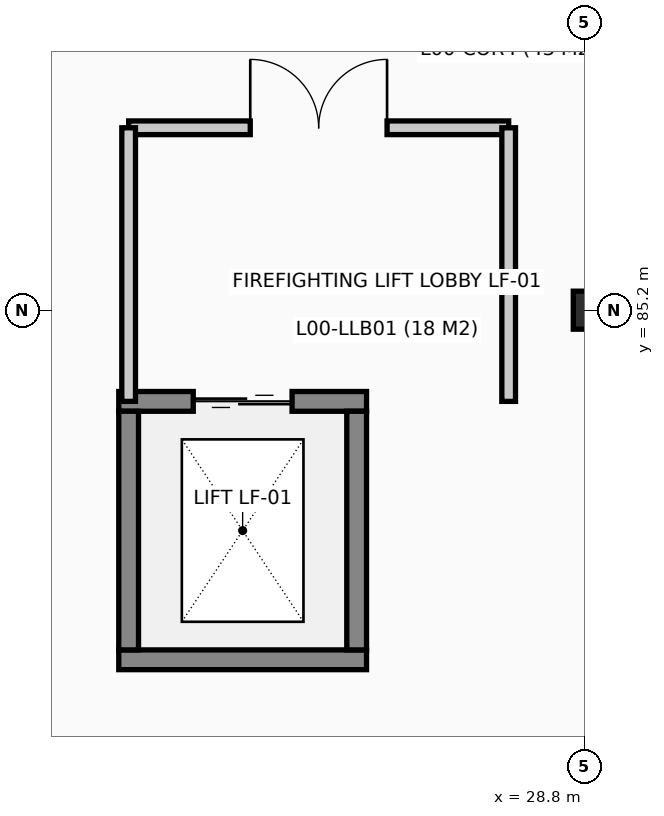
"""IFC4 building model, lengths in metres.
Left out: names, types, materials, properties, quantities, classifications, styles, units other than length and angle.
Written with IfcOpenShell. Run it as: python <this file> out.ifc"""

import sys

from ifc_helpers import new_model, si_unit, direction, frame, frame_2d, origin, origin_2d, place, context, subcontext, project, spatial, rectangle, i_section, extrude, element, fill, save


model = new_model("IFC4")
c1 = context("Model", 3, precision=1e-05, world=origin(), true_north=direction((0.0, 1.0)))
c2 = subcontext(c1, "Body", "Model", "MODEL_VIEW")
j1 = project(units=[si_unit("LENGTHUNIT", "METRE"), si_unit("PLANEANGLEUNIT", "RADIAN")], contexts=[c1])
p1 = place(None, origin())
s1 = spatial("IfcSite", under=j1, at=p1, CompositionType="ELEMENT")
p2 = place(p1, origin())
s2 = spatial("IfcBuilding", under=s1, at=p2, CompositionType="ELEMENT")
p3 = place(p2, origin())
s3 = spatial("IfcBuildingStorey", under=s2, at=p3, CompositionType="ELEMENT", Elevation=0.0)
p4 = place(p3, frame((28.8, 85.2, 0.0), z_axis=(0.0, 0.0, 1.0), x_axis=(1.0, 0.0, 0.0)))
e1 = element("IfcColumn", 1, at=p4, inside=s3, PredefinedType="COLUMN", context=c2, shape_type="SweptSolid", body=[
    extrude(i_section(OverallWidth=0.3, OverallDepth=0.5, WebThickness=0.014, FlangeThickness=0.028, at=origin_2d()), origin(), (0.0, 0.0, 1.0), 4.8),
])
p5 = place(p3, frame((22.67, 80.6, 0.0), z_axis=(0.0, 0.0, 1.0), x_axis=(1.0, 0.0, 0.0)))
e2 = element("IfcWall", 2, at=p5, inside=s3, PredefinedType="SHEAR", context=c2, shape_type="SweptSolid", body=[
    extrude(rectangle(XDim=3.26, YDim=0.26, at=frame_2d((1.63, 0.0))), origin(), (0.0, 0.0, 1.0), 4.58),
])
p6 = place(p3, frame((22.67, 84.0, 0.0), z_axis=(0.0, 0.0, 1.0), x_axis=(1.0, 0.0, 0.0)))
e3 = element("IfcWall", 3, at=p6, inside=s3, PredefinedType="SHEAR", context=c2, shape_type="SweptSolid", body=[
    extrude(rectangle(XDim=3.26, YDim=0.26, at=frame_2d((1.63, 0.0))), origin(), (0.0, 0.0, 1.0), 4.58),
])
p7 = place(p6, frame((0.98, 0.0, 0.0)))
e4 = element("IfcOpeningElement", 4, at=p7, cuts=e3, PredefinedType="OPENING", context=c2, shape_type="SweptSolid", body=[
    extrude(rectangle(XDim=1.3, YDim=2.2, at=frame_2d((0.65, 1.1))), frame((0.0, 0.14, 0.0), z_axis=(0.0, -1.0, 0.0), x_axis=(1.0, 0.0, 0.0)), (0.0, 0.0, 1.0), 0.28),
])
for number, where, z_axis, x_axis in (
    (5, (22.8, 80.73, 0.0), (0.0, 0.0, 1.0), (0.0, 1.0, 0.0)),
    (6, (25.8, 80.73, 0.0), (0.0, 0.0, 1.0), (0.0, 1.0, 0.0)),
):
    element("IfcWall", number, at=place(p3, frame(where, z_axis=z_axis, x_axis=x_axis)), inside=s3, PredefinedType="SHEAR", context=c2, shape_type="SweptSolid", body=[
        extrude(rectangle(XDim=3.14, YDim=0.26, at=frame_2d((1.57, 0.0))), origin(), (0.0, 0.0, 1.0), 4.58),
    ])
p8 = place(p3, frame((22.8, 87.6, 0.0), z_axis=(0.0, 0.0, 1.0), x_axis=(1.0, 0.0, 0.0)))
e7 = element("IfcWall", 7, at=p8, inside=s3, PredefinedType="PARTITIONING", context=c2, shape_type="SweptSolid", body=[
    extrude(rectangle(XDim=5.0, YDim=0.18, at=frame_2d((2.5, 0.0))), origin(), (0.0, 0.0, 1.0), 4.26),
])
p9 = place(p8, frame((1.6, 0.0, 0.0)))
e8 = element("IfcOpeningElement", 8, at=p9, cuts=e7, PredefinedType="OPENING", context=c2, shape_type="SweptSolid", body=[
    extrude(rectangle(XDim=1.8, YDim=2.15, at=frame_2d((0.9, 1.075))), frame((0.0, 0.1, 0.0), z_axis=(0.0, -1.0, 0.0), x_axis=(1.0, 0.0, 0.0)), (0.0, 0.0, 1.0), 0.2),
])
for number, where, z_axis, x_axis in (
    (9, (22.8, 84.0, 0.0), (0.0, 0.0, 1.0), (0.0, 1.0, 0.0)),
    (10, (27.8, 84.0, 0.0), (0.0, 0.0, 1.0), (0.0, 1.0, 0.0)),
):
    element("IfcWall", number, at=place(p3, frame(where, z_axis=z_axis, x_axis=x_axis)), inside=s3, PredefinedType="PARTITIONING", context=c2, shape_type="SweptSolid", body=[
        extrude(rectangle(XDim=3.6, YDim=0.18, at=frame_2d((1.8, 0.0))), origin(), (0.0, 0.0, 1.0), 4.565),
    ])
p10 = place(p7, origin())
e11 = element("IfcDoor", 11, at=p10, inside=s3, OperationType="DOUBLE_DOOR_SLIDING", PredefinedType="DOOR", context=c2, shape_type="SweptSolid", body=[
    extrude(rectangle(XDim=1.3, YDim=2.2, at=frame_2d((0.65, 1.1))), frame((0.0, 0.025, 0.0), z_axis=(0.0, -1.0, 0.0), x_axis=(1.0, 0.0, 0.0)), (0.0, 0.0, 1.0), 0.05),
])
fill(e4, e11)
p11 = place(p9, origin())
e12 = element("IfcDoor", 12, at=p11, inside=s3, OperationType="DOUBLE_DOOR_SINGLE_SWING", PredefinedType="DOOR", context=c2, shape_type="SweptSolid", body=[
    extrude(rectangle(XDim=1.8, YDim=2.15, at=frame_2d((0.9, 1.075))), frame((0.0, 0.025, 0.0), z_axis=(0.0, -1.0, 0.0), x_axis=(1.0, 0.0, 0.0)), (0.0, 0.0, 1.0), 0.05),
])
fill(e8, e12)
save(model, sys.argv[1])
